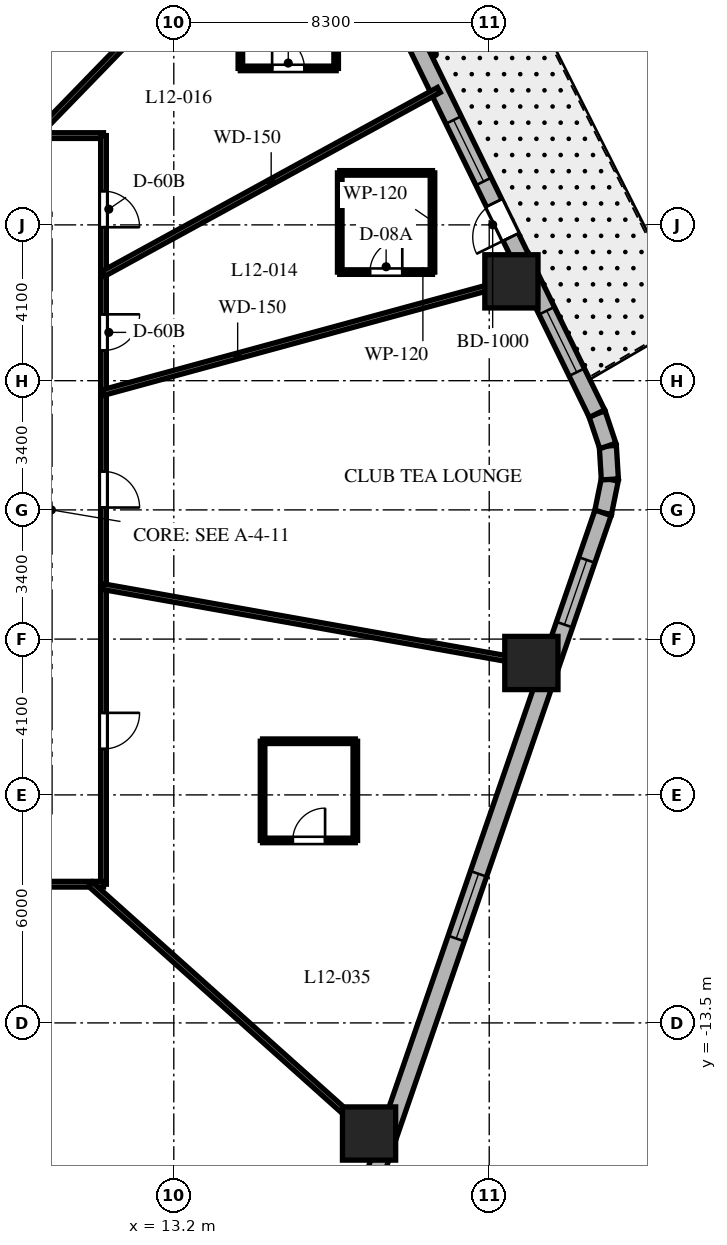
"""IFC4 building model, lengths in metres.
Left out: names, types, materials, properties, quantities, classifications, styles, units other than length and angle.
Written with IfcOpenShell. Run it as: python <this file> out.ifc"""

import sys

from ifc_helpers import new_model, si_unit, direction, frame, frame_2d, origin, origin_2d, place, context, subcontext, project, spatial, rectangle, extrude, element, fill, save


model = new_model("IFC4")
c1 = context("Model", 3, precision=1e-05, world=origin(), true_north=direction((0.0, 1.0)))
c2 = subcontext(c1, "Body", "Model", "MODEL_VIEW")
j1 = project(units=[si_unit("LENGTHUNIT", "METRE"), si_unit("PLANEANGLEUNIT", "RADIAN")], contexts=[c1])
p1 = place(None, origin())
s1 = spatial("IfcSite", under=j1, at=p1, CompositionType="ELEMENT")
p2 = place(p1, origin())
s2 = spatial("IfcBuilding", under=s1, at=p2, CompositionType="ELEMENT")
p3 = place(p2, frame((0.0, 0.0, 56.4)))
s3 = spatial("IfcBuildingStorey", under=s2, at=p3, CompositionType="ELEMENT", Elevation=56.4)
for number, where, z_axis, x_axis in (
    (1, (18.338, -16.411, 0.0), (0.0, 0.0, 1.0), (1.0, 0.0, 0.0)),
    (2, (22.609, -4.029, 0.0), (0.0, 0.0, 1.0), (1.0, 0.0, 0.0)),
    (3, (22.084, 6.014, 0.0), (0.0, 0.0, 1.0), (1.0, 0.0, 0.0)),
):
    element("IfcColumn", number, at=place(p3, frame(where, z_axis=z_axis, x_axis=x_axis)), inside=s3, PredefinedType="COLUMN", context=c2, shape_type="SweptSolid", body=[
        extrude(rectangle(XDim=1.4, YDim=1.4, at=origin_2d()), origin(), (0.0, 0.0, 1.0), 3.7),
    ])
p4 = place(p3, frame((24.496, -0.077, 0.0), z_axis=(0.0, 0.0, 1.0), x_axis=(0.199570594521, 0.979883451132, 0.0)))
e4 = element("IfcWall", 4, at=p4, inside=s3, PredefinedType="SOLIDWALL", context=c2, shape_type="SweptSolid", body=[
    extrude(rectangle(XDim=0.897, YDim=0.45, at=frame_2d((0.448, 0.0))), origin(), (0.0, 0.0, 1.0), 3.4),
])
p5 = place(p3, frame((24.675, 0.802, 0.0), z_axis=(0.0, 0.0, 1.0), x_axis=(-0.061188874166, 0.998126205286, 0.0)))
e5 = element("IfcWall", 5, at=p5, inside=s3, PredefinedType="SOLIDWALL", context=c2, shape_type="SweptSolid", body=[
    extrude(rectangle(XDim=0.882, YDim=0.45, at=frame_2d((0.441, 0.0))), origin(), (0.0, 0.0, 1.0), 3.4),
])
p6 = place(p3, frame((24.621, 1.682, 0.0), z_axis=(0.0, 0.0, 1.0), x_axis=(-0.317697451681, 0.948192137278, 0.0)))
e6 = element("IfcWall", 6, at=p6, inside=s3, PredefinedType="SOLIDWALL", context=c2, shape_type="SweptSolid", body=[
    extrude(rectangle(XDim=0.897, YDim=0.45, at=frame_2d((0.448, 0.0))), origin(), (0.0, 0.0, 1.0), 3.4),
])
p7 = place(p3, frame((17.39, -20.678, 0.0), z_axis=(0.0, 0.0, 1.0), x_axis=(0.326068018294, 0.945346310854, 0.0)))
e7 = element("IfcWall", 7, at=p7, inside=s3, PredefinedType="SOLIDWALL", context=c2, shape_type="SweptSolid", body=[
    extrude(rectangle(XDim=21.793, YDim=0.45, at=frame_2d((10.896, 0.0))), origin(), (0.0, 0.0, 1.0), 3.4),
])
p8 = place(p7, frame((1.26, 0.0, 0.8)))
e8 = element("IfcOpeningElement", 8, at=p8, cuts=e7, PredefinedType="OPENING", context=c2, shape_type="SweptSolid", body=[
    extrude(rectangle(XDim=1.8, YDim=1.8, at=frame_2d((0.9, 0.9))), frame((0.0, 0.235, 0.0), z_axis=(0.0, -1.0, 0.0), x_axis=(1.0, 0.0, 0.0)), (0.0, 0.0, 1.0), 0.47),
])
p9 = place(p7, frame((9.943, 0.0, 0.8)))
e9 = element("IfcOpeningElement", 9, at=p9, cuts=e7, PredefinedType="OPENING", context=c2, shape_type="SweptSolid", body=[
    extrude(rectangle(XDim=1.8, YDim=1.8, at=frame_2d((0.9, 0.9))), frame((0.0, 0.235, 0.0), z_axis=(0.0, -1.0, 0.0), x_axis=(1.0, 0.0, 0.0)), (0.0, 0.0, 1.0), 0.47),
])
p10 = place(p7, frame((18.68, 0.0, 0.8)))
e10 = element("IfcOpeningElement", 10, at=p10, cuts=e7, PredefinedType="OPENING", context=c2, shape_type="SweptSolid", body=[
    extrude(rectangle(XDim=1.8, YDim=1.8, at=frame_2d((0.9, 0.9))), frame((0.0, 0.235, 0.0), z_axis=(0.0, -1.0, 0.0), x_axis=(1.0, 0.0, 0.0)), (0.0, 0.0, 1.0), 0.47),
])
p11 = place(p3, frame((24.336, 2.532, 0.0), z_axis=(0.0, 0.0, 1.0), x_axis=(-0.438931326393, 0.898520612291, 0.0)))
e11 = element("IfcWall", 11, at=p11, inside=s3, PredefinedType="SOLIDWALL", context=c2, shape_type="SweptSolid", body=[
    extrude(rectangle(XDim=20.623, YDim=0.45, at=frame_2d((10.312, 0.0))), origin(), (0.0, 0.0, 1.0), 3.4),
])
p12 = place(p11, frame((5.171, 0.0, 0.0)))
e12 = element("IfcOpeningElement", 12, at=p12, cuts=e11, PredefinedType="OPENING", context=c2, shape_type="SweptSolid", body=[
    extrude(rectangle(XDim=1.0, YDim=2.15, at=frame_2d((0.5, 1.075))), frame((0.0, 0.235, 0.0), z_axis=(0.0, -1.0, 0.0), x_axis=(1.0, 0.0, 0.0)), (0.0, 0.0, 1.0), 0.47),
])
p13 = place(p11, frame((6.8, 0.0, 0.8)))
e13 = element("IfcOpeningElement", 13, at=p13, cuts=e11, PredefinedType="OPENING", context=c2, shape_type="SweptSolid", body=[
    extrude(rectangle(XDim=1.8, YDim=1.8, at=frame_2d((0.9, 0.9))), frame((0.0, 0.235, 0.0), z_axis=(0.0, -1.0, 0.0), x_axis=(1.0, 0.0, 0.0)), (0.0, 0.0, 1.0), 0.47),
])
p14 = place(p11, frame((11.942, 0.0, 0.8)))
e14 = element("IfcOpeningElement", 14, at=p14, cuts=e11, PredefinedType="OPENING", context=c2, shape_type="SweptSolid", body=[
    extrude(rectangle(XDim=1.8, YDim=1.8, at=frame_2d((0.9, 0.9))), frame((0.0, 0.235, 0.0), z_axis=(0.0, -1.0, 0.0), x_axis=(1.0, 0.0, 0.0)), (0.0, 0.0, 1.0), 0.47),
])
p15 = place(p11, frame((17.66, 0.0, 0.8)))
e15 = element("IfcOpeningElement", 15, at=p15, cuts=e11, PredefinedType="OPENING", context=c2, shape_type="SweptSolid", body=[
    extrude(rectangle(XDim=1.8, YDim=1.8, at=frame_2d((0.9, 0.9))), frame((0.0, 0.235, 0.0), z_axis=(0.0, -1.0, 0.0), x_axis=(1.0, 0.0, 0.0)), (0.0, 0.0, 1.0), 0.47),
])
p16 = place(p11, frame((1.214, 0.0, 0.8)))
e16 = element("IfcOpeningElement", 16, at=p16, cuts=e11, PredefinedType="OPENING", context=c2, shape_type="SweptSolid", body=[
    extrude(rectangle(XDim=1.8, YDim=1.8, at=frame_2d((0.9, 0.9))), frame((0.0, 0.235, 0.0), z_axis=(0.0, -1.0, 0.0), x_axis=(1.0, 0.0, 0.0)), (0.0, 0.0, 1.0), 0.47),
])
p17 = place(p3, frame((-11.35, 9.85, 0.0), z_axis=(0.0, 0.0, 1.0), x_axis=(1.0, 0.0, 0.0)))
e17 = element("IfcWall", 17, at=p17, inside=s3, PredefinedType="PARTITIONING", context=c2, shape_type="SweptSolid", body=[
    extrude(rectangle(XDim=22.7, YDim=0.15, at=frame_2d((11.35, 0.0))), origin(), (0.0, 0.0, 1.0), 2.84),
])
p18 = place(p17, frame((17.225, 0.0, 0.0)))
e18 = element("IfcOpeningElement", 18, at=p18, cuts=e17, PredefinedType="OPENING", context=c2, shape_type="SweptSolid", body=[
    extrude(rectangle(XDim=0.95, YDim=2.03, at=frame_2d((0.475, 1.015))), frame((0.0, 0.085, 0.0), z_axis=(0.0, -1.0, 0.0), x_axis=(1.0, 0.0, 0.0)), (0.0, 0.0, 1.0), 0.17),
])
p19 = place(p17, frame((10.444, 0.0, 0.0)))
e19 = element("IfcOpeningElement", 19, at=p19, cuts=e17, PredefinedType="OPENING", context=c2, shape_type="SweptSolid", body=[
    extrude(rectangle(XDim=0.95, YDim=2.03, at=frame_2d((0.475, 1.015))), frame((0.0, 0.085, 0.0), z_axis=(0.0, -1.0, 0.0), x_axis=(1.0, 0.0, 0.0)), (0.0, 0.0, 1.0), 0.17),
])
p20 = place(p17, frame((3.369, 0.0, 0.0)))
e20 = element("IfcOpeningElement", 20, at=p20, cuts=e17, PredefinedType="OPENING", context=c2, shape_type="SweptSolid", body=[
    extrude(rectangle(XDim=0.95, YDim=2.03, at=frame_2d((0.475, 1.015))), frame((0.0, 0.085, 0.0), z_axis=(0.0, -1.0, 0.0), x_axis=(1.0, 0.0, 0.0)), (0.0, 0.0, 1.0), 0.17),
])
p21 = place(p3, frame((11.35, 9.85, 0.0), z_axis=(0.0, 0.0, 1.0), x_axis=(0.0, -1.0, 0.0)))
e21 = element("IfcWall", 21, at=p21, inside=s3, PredefinedType="PARTITIONING", context=c2, shape_type="SweptSolid", body=[
    extrude(rectangle(XDim=19.7, YDim=0.15, at=frame_2d((9.85, 0.0))), origin(), (0.0, 0.0, 1.0), 2.84),
])
p22 = place(p21, frame((4.704, 0.0, 0.0)))
e22 = element("IfcOpeningElement", 22, at=p22, cuts=e21, PredefinedType="OPENING", context=c2, shape_type="SweptSolid", body=[
    extrude(rectangle(XDim=0.95, YDim=2.03, at=frame_2d((0.475, 1.015))), frame((0.0, 0.085, 0.0), z_axis=(0.0, -1.0, 0.0), x_axis=(1.0, 0.0, 0.0)), (0.0, 0.0, 1.0), 0.17),
])
p23 = place(p21, frame((1.462, 0.0, 0.0)))
e23 = element("IfcOpeningElement", 23, at=p23, cuts=e21, PredefinedType="OPENING", context=c2, shape_type="SweptSolid", body=[
    extrude(rectangle(XDim=0.95, YDim=2.03, at=frame_2d((0.475, 1.015))), frame((0.0, 0.085, 0.0), z_axis=(0.0, -1.0, 0.0), x_axis=(1.0, 0.0, 0.0)), (0.0, 0.0, 1.0), 0.17),
])
p24 = place(p21, frame((15.191, 0.0, 0.0)))
e24 = element("IfcOpeningElement", 24, at=p24, cuts=e21, PredefinedType="OPENING", context=c2, shape_type="SweptSolid", body=[
    extrude(rectangle(XDim=0.95, YDim=2.03, at=frame_2d((0.475, 1.015))), frame((0.0, 0.085, 0.0), z_axis=(0.0, -1.0, 0.0), x_axis=(1.0, 0.0, 0.0)), (0.0, 0.0, 1.0), 0.17),
])
p25 = place(p21, frame((8.838, 0.0, 0.0)))
e25 = element("IfcOpeningElement", 25, at=p25, cuts=e21, PredefinedType="OPENING", context=c2, shape_type="SweptSolid", body=[
    extrude(rectangle(XDim=0.95, YDim=2.03, at=frame_2d((0.475, 1.015))), frame((0.0, 0.085, 0.0), z_axis=(0.0, -1.0, 0.0), x_axis=(1.0, 0.0, 0.0)), (0.0, 0.0, 1.0), 0.17),
])
p26 = place(p3, frame((11.35, -9.85, 0.0), z_axis=(0.0, 0.0, 1.0), x_axis=(-1.0, 0.0, 0.0)))
e26 = element("IfcWall", 26, at=p26, inside=s3, PredefinedType="PARTITIONING", context=c2, shape_type="SweptSolid", body=[
    extrude(rectangle(XDim=22.7, YDim=0.15, at=frame_2d((11.35, 0.0))), origin(), (0.0, 0.0, 1.0), 2.84),
])
p27 = place(p26, frame((17.225, 0.0, 0.0)))
e27 = element("IfcOpeningElement", 27, at=p27, cuts=e26, PredefinedType="OPENING", context=c2, shape_type="SweptSolid", body=[
    extrude(rectangle(XDim=0.95, YDim=2.03, at=frame_2d((0.475, 1.015))), frame((0.0, 0.085, 0.0), z_axis=(0.0, -1.0, 0.0), x_axis=(1.0, 0.0, 0.0)), (0.0, 0.0, 1.0), 0.17),
])
p28 = place(p26, frame((10.444, 0.0, 0.0)))
e28 = element("IfcOpeningElement", 28, at=p28, cuts=e26, PredefinedType="OPENING", context=c2, shape_type="SweptSolid", body=[
    extrude(rectangle(XDim=0.95, YDim=2.03, at=frame_2d((0.475, 1.015))), frame((0.0, 0.085, 0.0), z_axis=(0.0, -1.0, 0.0), x_axis=(1.0, 0.0, 0.0)), (0.0, 0.0, 1.0), 0.17),
])
p29 = place(p26, frame((3.369, 0.0, 0.0)))
e29 = element("IfcOpeningElement", 29, at=p29, cuts=e26, PredefinedType="OPENING", context=c2, shape_type="SweptSolid", body=[
    extrude(rectangle(XDim=0.95, YDim=2.03, at=frame_2d((0.475, 1.015))), frame((0.0, 0.085, 0.0), z_axis=(0.0, -1.0, 0.0), x_axis=(1.0, 0.0, 0.0)), (0.0, 0.0, 1.0), 0.17),
])
p30 = place(p3, frame((11.35, 3.091, 0.0), z_axis=(0.0, 0.0, 1.0), x_axis=(0.964859685283, 0.262765651704, 0.0)))
e30 = element("IfcWall", 30, at=p30, inside=s3, PredefinedType="PARTITIONING", context=c2, shape_type="SweptSolid", body=[
    extrude(rectangle(XDim=11.629, YDim=0.15, at=frame_2d((5.814, 0.0))), origin(), (0.0, 0.0, 1.0), 2.54),
])
p31 = place(p3, frame((11.35, 6.217, 0.0), z_axis=(0.0, 0.0, 1.0), x_axis=(0.877047587135, 0.480403507378, 0.0)))
e31 = element("IfcWall", 31, at=p31, inside=s3, PredefinedType="PARTITIONING", context=c2, shape_type="SweptSolid", body=[
    extrude(rectangle(XDim=10.062, YDim=0.15, at=frame_2d((5.031, 0.0))), origin(), (0.0, 0.0, 1.0), 2.54),
])
p32 = place(p3, frame((9.558, 9.85, 0.0), z_axis=(0.0, 0.0, 1.0), x_axis=(0.69638346089, 0.717669893056, 0.0)))
e32 = element("IfcWall", 32, at=p32, inside=s3, PredefinedType="PARTITIONING", context=c2, shape_type="SweptSolid", body=[
    extrude(rectangle(XDim=10.701, YDim=0.15, at=frame_2d((5.351, 0.0))), origin(), (0.0, 0.0, 1.0), 2.54),
])
p33 = place(p3, frame((11.007, -9.85, 0.0), z_axis=(0.0, 0.0, 1.0), x_axis=(0.745177305978, -0.666866390407, 0.0)))
e33 = element("IfcWall", 33, at=p33, inside=s3, PredefinedType="PARTITIONING", context=c2, shape_type="SweptSolid", body=[
    extrude(rectangle(XDim=10.375, YDim=0.15, at=frame_2d((5.188, 0.0))), origin(), (0.0, 0.0, 1.0), 2.54),
])
p34 = place(p3, frame((11.35, -2.023, 0.0), z_axis=(0.0, 0.0, 1.0), x_axis=(0.984493741877, -0.17541970301, 0.0)))
e34 = element("IfcWall", 34, at=p34, inside=s3, PredefinedType="PARTITIONING", context=c2, shape_type="SweptSolid", body=[
    extrude(rectangle(XDim=11.937, YDim=0.15, at=frame_2d((5.969, 0.0))), origin(), (0.0, 0.0, 1.0), 2.54),
])
p35 = place(p3, frame((17.567, 6.258, 0.0), z_axis=(0.0, 0.0, 1.0), x_axis=(1.0, 0.0, 0.0)))
e35 = element("IfcWall", 35, at=p35, inside=s3, PredefinedType="PARTITIONING", context=c2, shape_type="SweptSolid", body=[
    extrude(rectangle(XDim=2.44, YDim=0.12, at=frame_2d((1.22, 0.0))), origin(), (0.0, 0.0, 1.0), 2.84),
])
p36 = place(p35, frame((0.795, 0.0, 0.0)))
e36 = element("IfcOpeningElement", 36, at=p36, cuts=e35, PredefinedType="OPENING", context=c2, shape_type="SweptSolid", body=[
    extrude(rectangle(XDim=0.85, YDim=2.03, at=frame_2d((0.425, 1.015))), frame((0.0, 0.07, 0.0), z_axis=(0.0, -1.0, 0.0), x_axis=(1.0, 0.0, 0.0)), (0.0, 0.0, 1.0), 0.14),
])
p37 = place(p3, frame((20.007, 6.258, 0.0), z_axis=(0.0, 0.0, 1.0), x_axis=(0.0, 1.0, 0.0)))
e37 = element("IfcWall", 37, at=p37, inside=s3, PredefinedType="PARTITIONING", context=c2, shape_type="SweptSolid", body=[
    extrude(rectangle(XDim=2.61, YDim=0.12, at=frame_2d((1.305, 0.0))), origin(), (0.0, 0.0, 1.0), 2.84),
])
p38 = place(p3, frame((20.007, 8.868, 0.0), z_axis=(0.0, 0.0, 1.0), x_axis=(-1.0, 0.0, 0.0)))
e38 = element("IfcWall", 38, at=p38, inside=s3, PredefinedType="PARTITIONING", context=c2, shape_type="SweptSolid", body=[
    extrude(rectangle(XDim=2.44, YDim=0.12, at=frame_2d((1.22, 0.0))), origin(), (0.0, 0.0, 1.0), 3.4),
])
p39 = place(p3, frame((17.567, 8.868, 0.0), z_axis=(0.0, 0.0, 1.0), x_axis=(0.0, -1.0, 0.0)))
e39 = element("IfcWall", 39, at=p39, inside=s3, PredefinedType="PARTITIONING", context=c2, shape_type="SweptSolid", body=[
    extrude(rectangle(XDim=2.61, YDim=0.12, at=frame_2d((1.305, 0.0))), origin(), (0.0, 0.0, 1.0), 2.84),
])
p40 = place(p3, frame((14.952, 11.618, 0.0), z_axis=(0.0, 0.0, 1.0), x_axis=(1.0, 0.0, 0.0)))
e40 = element("IfcWall", 40, at=p40, inside=s3, PredefinedType="PARTITIONING", context=c2, shape_type="SweptSolid", body=[
    extrude(rectangle(XDim=2.52, YDim=0.12, at=frame_2d((1.26, 0.0))), origin(), (0.0, 0.0, 1.0), 2.927),
])
p41 = place(p40, frame((0.835, 0.0, 0.0)))
e41 = element("IfcOpeningElement", 41, at=p41, cuts=e40, PredefinedType="OPENING", context=c2, shape_type="SweptSolid", body=[
    extrude(rectangle(XDim=0.85, YDim=2.03, at=frame_2d((0.425, 1.015))), frame((0.0, 0.07, 0.0), z_axis=(0.0, -1.0, 0.0), x_axis=(1.0, 0.0, 0.0)), (0.0, 0.0, 1.0), 0.14),
])
p42 = place(p3, frame((17.472, 11.618, 0.0), z_axis=(0.0, 0.0, 1.0), x_axis=(0.0, 1.0, 0.0)))
e42 = element("IfcWall", 42, at=p42, inside=s3, PredefinedType="PARTITIONING", context=c2, shape_type="SweptSolid", body=[
    extrude(rectangle(XDim=2.68, YDim=0.12, at=frame_2d((1.34, 0.0))), origin(), (0.0, 0.0, 1.0), 3.4),
])
p43 = place(p3, frame((14.952, 14.298, 0.0), z_axis=(0.0, 0.0, 1.0), x_axis=(0.0, -1.0, 0.0)))
e43 = element("IfcWall", 43, at=p43, inside=s3, PredefinedType="PARTITIONING", context=c2, shape_type="SweptSolid", body=[
    extrude(rectangle(XDim=2.68, YDim=0.12, at=frame_2d((1.34, 0.0))), origin(), (0.0, 0.0, 1.0), 2.927),
])
p44 = place(p3, frame((15.536, -8.698, 0.0), z_axis=(0.0, 0.0, 1.0), x_axis=(1.0, 0.0, 0.0)))
e44 = element("IfcWall", 44, at=p44, inside=s3, PredefinedType="PARTITIONING", context=c2, shape_type="SweptSolid", body=[
    extrude(rectangle(XDim=2.44, YDim=0.12, at=frame_2d((1.22, 0.0))), origin(), (0.0, 0.0, 1.0), 2.972),
])
p45 = place(p44, frame((0.795, 0.0, 0.0)))
e45 = element("IfcOpeningElement", 45, at=p45, cuts=e44, PredefinedType="OPENING", context=c2, shape_type="SweptSolid", body=[
    extrude(rectangle(XDim=0.85, YDim=2.03, at=frame_2d((0.425, 1.015))), frame((0.0, 0.07, 0.0), z_axis=(0.0, -1.0, 0.0), x_axis=(1.0, 0.0, 0.0)), (0.0, 0.0, 1.0), 0.14),
])
p46 = place(p3, frame((17.976, -8.698, 0.0), z_axis=(0.0, 0.0, 1.0), x_axis=(0.0, 1.0, 0.0)))
e46 = element("IfcWall", 46, at=p46, inside=s3, PredefinedType="PARTITIONING", context=c2, shape_type="SweptSolid", body=[
    extrude(rectangle(XDim=2.61, YDim=0.12, at=frame_2d((1.305, 0.0))), origin(), (0.0, 0.0, 1.0), 2.972),
])
p47 = place(p3, frame((17.976, -6.088, 0.0), z_axis=(0.0, 0.0, 1.0), x_axis=(-1.0, 0.0, 0.0)))
e47 = element("IfcWall", 47, at=p47, inside=s3, PredefinedType="PARTITIONING", context=c2, shape_type="SweptSolid", body=[
    extrude(rectangle(XDim=2.44, YDim=0.12, at=frame_2d((1.22, 0.0))), origin(), (0.0, 0.0, 1.0), 2.972),
])
p48 = place(p3, frame((15.536, -6.088, 0.0), z_axis=(0.0, 0.0, 1.0), x_axis=(0.0, -1.0, 0.0)))
e48 = element("IfcWall", 48, at=p48, inside=s3, PredefinedType="PARTITIONING", context=c2, shape_type="SweptSolid", body=[
    extrude(rectangle(XDim=2.61, YDim=0.12, at=frame_2d((1.305, 0.0))), origin(), (0.0, 0.0, 1.0), 3.4),
])
p49 = place(p9, origin())
e49 = element("IfcWindow", 49, at=p49, inside=s3, PartitioningType="SINGLE_PANEL", PredefinedType="WINDOW", context=c2, shape_type="SweptSolid", body=[
    extrude(rectangle(XDim=1.8, YDim=1.8, at=frame_2d((0.9, 0.9))), frame((0.0, 0.03, 0.0), z_axis=(0.0, -1.0, 0.0), x_axis=(1.0, 0.0, 0.0)), (0.0, 0.0, 1.0), 0.06),
])
fill(e9, e49)
p50 = place(p10, origin())
e50 = element("IfcWindow", 50, at=p50, inside=s3, PartitioningType="SINGLE_PANEL", PredefinedType="WINDOW", context=c2, shape_type="SweptSolid", body=[
    extrude(rectangle(XDim=1.8, YDim=1.8, at=frame_2d((0.9, 0.9))), frame((0.0, 0.03, 0.0), z_axis=(0.0, -1.0, 0.0), x_axis=(1.0, 0.0, 0.0)), (0.0, 0.0, 1.0), 0.06),
])
fill(e10, e50)
p51 = place(p12, origin())
e51 = element("IfcDoor", 51, at=p51, inside=s3, OperationType="SINGLE_SWING_LEFT", PredefinedType="DOOR", context=c2, shape_type="SweptSolid", body=[
    extrude(rectangle(XDim=1.0, YDim=2.15, at=frame_2d((0.5, 1.075))), frame((0.0, 0.025, 0.0), z_axis=(0.0, -1.0, 0.0), x_axis=(1.0, 0.0, 0.0)), (0.0, 0.0, 1.0), 0.05),
])
fill(e12, e51)
p52 = place(p13, origin())
e52 = element("IfcWindow", 52, at=p52, inside=s3, PartitioningType="SINGLE_PANEL", PredefinedType="WINDOW", context=c2, shape_type="SweptSolid", body=[
    extrude(rectangle(XDim=1.8, YDim=1.8, at=frame_2d((0.9, 0.9))), frame((0.0, 0.03, 0.0), z_axis=(0.0, -1.0, 0.0), x_axis=(1.0, 0.0, 0.0)), (0.0, 0.0, 1.0), 0.06),
])
fill(e13, e52)
p53 = place(p16, origin())
e53 = element("IfcWindow", 53, at=p53, inside=s3, PartitioningType="SINGLE_PANEL", PredefinedType="WINDOW", context=c2, shape_type="SweptSolid", body=[
    extrude(rectangle(XDim=1.8, YDim=1.8, at=frame_2d((0.9, 0.9))), frame((0.0, 0.03, 0.0), z_axis=(0.0, -1.0, 0.0), x_axis=(1.0, 0.0, 0.0)), (0.0, 0.0, 1.0), 0.06),
])
fill(e16, e53)
p54 = place(p22, origin())
e54 = element("IfcDoor", 54, at=p54, inside=s3, OperationType="SINGLE_SWING_LEFT", PredefinedType="DOOR", context=c2, shape_type="SweptSolid", body=[
    extrude(rectangle(XDim=0.95, YDim=2.03, at=frame_2d((0.475, 1.015))), frame((0.0, 0.025, 0.0), z_axis=(0.0, -1.0, 0.0), x_axis=(1.0, 0.0, 0.0)), (0.0, 0.0, 1.0), 0.05),
])
fill(e22, e54)
p55 = place(p36, origin())
e55 = element("IfcDoor", 55, at=p55, inside=s3, OperationType="SINGLE_SWING_RIGHT", PredefinedType="DOOR", context=c2, shape_type="SweptSolid", body=[
    extrude(rectangle(XDim=0.85, YDim=2.03, at=frame_2d((0.425, 1.015))), frame((0.0, 0.025, 0.0), z_axis=(0.0, -1.0, 0.0), x_axis=(1.0, 0.0, 0.0)), (0.0, 0.0, 1.0), 0.05),
])
fill(e36, e55)
p56 = place(p23, origin())
e56 = element("IfcDoor", 56, at=p56, inside=s3, OperationType="SINGLE_SWING_RIGHT", PredefinedType="DOOR", context=c2, shape_type="SweptSolid", body=[
    extrude(rectangle(XDim=0.95, YDim=2.03, at=frame_2d((0.475, 1.015))), frame((0.0, 0.025, 0.0), z_axis=(0.0, -1.0, 0.0), x_axis=(1.0, 0.0, 0.0)), (0.0, 0.0, 1.0), 0.05),
])
fill(e23, e56)
p57 = place(p41, origin())
e57 = element("IfcDoor", 57, at=p57, inside=s3, OperationType="SINGLE_SWING_LEFT", PredefinedType="DOOR", context=c2, shape_type="SweptSolid", body=[
    extrude(rectangle(XDim=0.85, YDim=2.03, at=frame_2d((0.425, 1.015))), frame((0.0, 0.025, 0.0), z_axis=(0.0, -1.0, 0.0), x_axis=(1.0, 0.0, 0.0)), (0.0, 0.0, 1.0), 0.05),
])
fill(e41, e57)
p58 = place(p24, origin())
e58 = element("IfcDoor", 58, at=p58, inside=s3, OperationType="SINGLE_SWING_LEFT", PredefinedType="DOOR", context=c2, shape_type="SweptSolid", body=[
    extrude(rectangle(XDim=0.95, YDim=2.03, at=frame_2d((0.475, 1.015))), frame((0.0, 0.025, 0.0), z_axis=(0.0, -1.0, 0.0), x_axis=(1.0, 0.0, 0.0)), (0.0, 0.0, 1.0), 0.05),
])
fill(e24, e58)
p59 = place(p45, origin())
e59 = element("IfcDoor", 59, at=p59, inside=s3, OperationType="SINGLE_SWING_RIGHT", PredefinedType="DOOR", context=c2, shape_type="SweptSolid", body=[
    extrude(rectangle(XDim=0.85, YDim=2.03, at=frame_2d((0.425, 1.015))), frame((0.0, 0.025, 0.0), z_axis=(0.0, -1.0, 0.0), x_axis=(1.0, 0.0, 0.0)), (0.0, 0.0, 1.0), 0.05),
])
fill(e45, e59)
p60 = place(p25, origin())
e60 = element("IfcDoor", 60, at=p60, inside=s3, OperationType="SINGLE_SWING_RIGHT", PredefinedType="DOOR", context=c2, shape_type="SweptSolid", body=[
    extrude(rectangle(XDim=0.95, YDim=2.03, at=frame_2d((0.475, 1.015))), frame((0.0, 0.025, 0.0), z_axis=(0.0, -1.0, 0.0), x_axis=(1.0, 0.0, 0.0)), (0.0, 0.0, 1.0), 0.05),
])
fill(e25, e60)
save(model, sys.argv[1])
